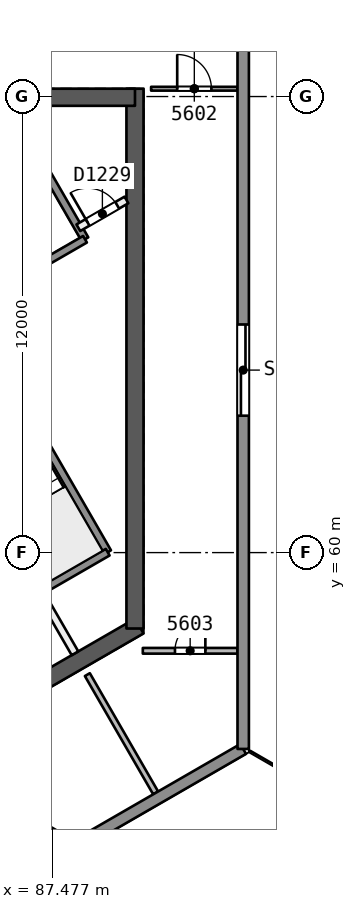
"""IFC4 building model, lengths in metres.
Left out: names, types, materials, properties, quantities, classifications, styles, units other than length and angle.
Written with IfcOpenShell. Run it as: python <this file> out.ifc"""

import sys

from ifc_helpers import new_model, si_unit, direction, frame, frame_2d, origin, origin_2d, place, context, subcontext, project, spatial, rectangle, extrude, element, fill, save


model = new_model("IFC4")
c1 = context("Model", 3, precision=1e-05, world=origin(), true_north=direction((0.0, 1.0)))
c2 = subcontext(c1, "Body", "Model", "MODEL_VIEW")
j1 = project(units=[si_unit("LENGTHUNIT", "METRE"), si_unit("PLANEANGLEUNIT", "RADIAN")], contexts=[c1])
p1 = place(None, origin())
s1 = spatial("IfcSite", under=j1, at=p1, CompositionType="ELEMENT")
p2 = place(p1, origin())
s2 = spatial("IfcBuilding", under=s1, at=p2, CompositionType="ELEMENT")
p3 = place(p2, frame((0.0, 0.0, 228.0)))
s3 = spatial("IfcBuildingStorey", under=s2, at=p3, CompositionType="ELEMENT", Elevation=228.0)
p4 = place(p3, frame((86.723, 56.31, 0.0), z_axis=(0.0, 0.0, 1.0), x_axis=(0.866042179588, 0.49997094233, 0.0)))
e1 = element("IfcWall", 1, at=p4, inside=s3, PredefinedType="SHEAR", context=c2, shape_type="SweptSolid", body=[
    extrude(rectangle(XDim=3.515, YDim=0.45, at=frame_2d((1.758, 0.0))), origin(), (0.0, 0.0, 1.0), 3.7),
])
p5 = place(p3, frame((89.655, 58.002, 0.0), z_axis=(0.0, 0.0, 1.0), x_axis=(0.0, 1.0, 0.0)))
e2 = element("IfcWall", 2, at=p5, inside=s3, PredefinedType="SHEAR", context=c2, shape_type="SweptSolid", body=[
    extrude(rectangle(XDim=14.204, YDim=0.45, at=frame_2d((7.102, 0.0))), origin(), (0.0, 0.0, 1.0), 3.7),
])
p6 = place(p3, frame((89.655, 71.981, 0.0), z_axis=(0.0, 0.0, 1.0), x_axis=(-1.0, 0.0, 0.0)))
e3 = element("IfcWall", 3, at=p6, inside=s3, PredefinedType="SHEAR", context=c2, shape_type="SweptSolid", body=[
    extrude(rectangle(XDim=10.155, YDim=0.45, at=frame_2d((5.078, 0.0))), origin(), (0.0, 0.0, 1.0), 3.7),
])
p7 = place(p6, frame((8.005, 0.0, 0.0)))
e4 = element("IfcOpeningElement", 4, at=p7, cuts=e3, PredefinedType="OPENING", context=c2, shape_type="SweptSolid", body=[
    extrude(rectangle(XDim=1.2, YDim=2.1, at=frame_2d((0.6, 1.05))), frame((0.0, 0.235, 0.0), z_axis=(0.0, -1.0, 0.0), x_axis=(1.0, 0.0, 0.0)), (0.0, 0.0, 1.0), 0.471),
])
p8 = place(p3, frame((91.548, 51.338, 0.0), z_axis=(-0.017607037296, 0.030466109479, 0.999380712447), x_axis=(0.500055571201, -0.865278125299, 0.035187946645)))
e5 = element("IfcColumn", 5, at=p8, inside=s3, PredefinedType="COLUMN", context=c2, shape_type="SweptSolid", body=[
    extrude(rectangle(XDim=1.9, YDim=1.9, at=origin_2d()), origin(), (0.0, 0.0, 1.0), 3.702),
])
p9 = place(p3, frame((90.079, 72.206, 0.0), z_axis=(0.0, 0.0, 1.0), x_axis=(1.0, 0.0, 0.0)))
e6 = element("IfcWall", 6, at=p9, inside=s3, PredefinedType="PARTITIONING", context=c2, shape_type="SweptSolid", body=[
    extrude(rectangle(XDim=2.274, YDim=0.1, at=frame_2d((1.137, 0.0))), origin(), (0.0, 0.0, 1.0), 3.3),
])
p10 = place(p9, frame((0.687, 0.0, 0.0)))
e7 = element("IfcOpeningElement", 7, at=p10, cuts=e6, PredefinedType="OPENING", context=c2, shape_type="SweptSolid", body=[
    extrude(rectangle(XDim=0.9, YDim=2.1, at=frame_2d((0.45, 1.05))), frame((0.0, 0.061, 0.0), z_axis=(0.0, -1.0, 0.0), x_axis=(1.0, 0.0, 0.0)), (0.0, 0.0, 1.0), 0.121),
])
p11 = place(p3, frame((89.861, 57.417, 0.0), z_axis=(0.0, 0.0, 1.0), x_axis=(1.0, 0.0, 0.0)))
e8 = element("IfcWall", 8, at=p11, inside=s3, PredefinedType="PARTITIONING", context=c2, shape_type="SweptSolid", body=[
    extrude(rectangle(XDim=2.492, YDim=0.15, at=frame_2d((1.246, 0.0))), origin(), (0.0, 0.0, 1.0), 3.3),
])
p12 = place(p11, frame((0.846, 0.0, 0.0)))
e9 = element("IfcOpeningElement", 9, at=p12, cuts=e8, PredefinedType="OPENING", context=c2, shape_type="SweptSolid", body=[
    extrude(rectangle(XDim=0.8, YDim=2.1, at=frame_2d((0.4, 1.05))), frame((0.0, 0.085, 0.0), z_axis=(0.0, -1.0, 0.0), x_axis=(1.0, 0.0, 0.0)), (0.0, 0.0, 1.0), 0.171),
])
p13 = place(p3, frame((88.402, 56.789, 0.0), z_axis=(0.0, 0.0, 1.0), x_axis=(0.500032055595, -0.866006895687, 0.0)))
e10 = element("IfcWall", 10, at=p13, inside=s3, PredefinedType="PARTITIONING", context=c2, shape_type="SweptSolid", body=[
    extrude(rectangle(XDim=3.595, YDim=0.15, at=frame_2d((1.797, 0.0))), origin(), (0.0, 0.0, 1.0), 3.3),
])
p14 = place(p3, frame((92.503, 54.834, 0.0), z_axis=(0.0, 0.0, 1.0), x_axis=(-0.866011086668, -0.500024797153, 0.0)))
e11 = element("IfcWall", 11, at=p14, inside=s3, PredefinedType="SOLIDWALL", context=c2, shape_type="SweptSolid", body=[
    extrude(rectangle(XDim=5.149, YDim=0.3, at=frame_2d((2.575, 0.0))), origin(), (0.0, 0.0, 1.0), 3.3),
])
p15 = place(p3, frame((92.503, 105.166, 0.0), z_axis=(0.0, 0.0, 1.0), x_axis=(0.0, -1.0, 0.0)))
e12 = element("IfcWall", 12, at=p15, inside=s3, PredefinedType="SOLIDWALL", context=c2, shape_type="SweptSolid", body=[
    extrude(rectangle(XDim=50.333, YDim=0.3, at=frame_2d((25.166, 0.0))), origin(), (0.0, 0.0, 1.0), 3.3),
])
p16 = place(p15, frame((29.111, 0.0, 0.0)))
e13 = element("IfcOpeningElement", 13, at=p16, cuts=e12, PredefinedType="OPENING", context=c2, shape_type="SweptSolid", body=[
    extrude(rectangle(XDim=2.4, YDim=2.4, at=frame_2d((1.2, 1.2))), frame((0.0, 0.161, 0.0), z_axis=(0.0, -1.0, 0.0), x_axis=(1.0, 0.0, 0.0)), (0.0, 0.0, 1.0), 0.321),
])
p17 = place(p15, frame((39.164, 0.0, 0.0)))
e14 = element("IfcOpeningElement", 14, at=p17, cuts=e12, PredefinedType="OPENING", context=c2, shape_type="SweptSolid", body=[
    extrude(rectangle(XDim=2.4, YDim=2.4, at=frame_2d((1.2, 1.2))), frame((0.0, 0.161, 0.0), z_axis=(0.0, -1.0, 0.0), x_axis=(1.0, 0.0, 0.0)), (0.0, 0.0, 1.0), 0.321),
])
p18 = place(p15, frame((18.666, 0.0, 0.0)))
e15 = element("IfcOpeningElement", 15, at=p18, cuts=e12, PredefinedType="OPENING", context=c2, shape_type="SweptSolid", body=[
    extrude(rectangle(XDim=2.4, YDim=2.4, at=frame_2d((1.2, 1.2))), frame((0.0, 0.161, 0.0), z_axis=(0.0, -1.0, 0.0), x_axis=(1.0, 0.0, 0.0)), (0.0, 0.0, 1.0), 0.321),
])
p19 = place(p15, frame((8.763, 0.0, 0.0)))
e16 = element("IfcOpeningElement", 16, at=p19, cuts=e12, PredefinedType="OPENING", context=c2, shape_type="SweptSolid", body=[
    extrude(rectangle(XDim=2.4, YDim=2.4, at=frame_2d((1.2, 1.2))), frame((0.0, 0.161, 0.0), z_axis=(0.0, -1.0, 0.0), x_axis=(1.0, 0.0, 0.0)), (0.0, 0.0, 1.0), 0.321),
])
p20 = place(p15, frame((23.811, 0.0, 0.0)))
e17 = element("IfcOpeningElement", 17, at=p20, cuts=e12, PredefinedType="OPENING", context=c2, shape_type="SweptSolid", body=[
    extrude(rectangle(XDim=2.4, YDim=2.4, at=frame_2d((1.2, 1.2))), frame((0.0, 0.161, 0.0), z_axis=(0.0, -1.0, 0.0), x_axis=(1.0, 0.0, 0.0)), (0.0, 0.0, 1.0), 0.321),
])
p21 = place(p3, frame((88.043, 52.259, 0.0), z_axis=(0.0, 0.0, 1.0), x_axis=(-0.86602387423, 0.500002649256, 0.0)))
e18 = element("IfcWall", 18, at=p21, inside=s3, PredefinedType="SOLIDWALL", context=c2, shape_type="SweptSolid", body=[
    extrude(rectangle(XDim=50.333, YDim=0.3, at=frame_2d((25.167, 0.0))), origin(), (0.0, 0.0, 1.0), 3.3),
])
p22 = place(p21, frame((23.187, 0.0, 0.0)))
e19 = element("IfcOpeningElement", 19, at=p22, cuts=e18, PredefinedType="OPENING", context=c2, shape_type="SweptSolid", body=[
    extrude(rectangle(XDim=2.4, YDim=2.4, at=frame_2d((1.2, 1.2))), frame((0.0, 0.161, 0.0), z_axis=(0.0, -1.0, 0.0), x_axis=(1.0, 0.0, 0.0)), (0.0, 0.0, 1.0), 0.321),
])
p23 = place(p21, frame((28.799, 0.0, 0.0)))
e20 = element("IfcOpeningElement", 20, at=p23, cuts=e18, PredefinedType="OPENING", context=c2, shape_type="SweptSolid", body=[
    extrude(rectangle(XDim=2.4, YDim=2.4, at=frame_2d((1.2, 1.2))), frame((0.0, 0.161, 0.0), z_axis=(0.0, -1.0, 0.0), x_axis=(1.0, 0.0, 0.0)), (0.0, 0.0, 1.0), 0.321),
])
p24 = place(p21, frame((39.164, 0.0, 0.0)))
e21 = element("IfcOpeningElement", 21, at=p24, cuts=e18, PredefinedType="OPENING", context=c2, shape_type="SweptSolid", body=[
    extrude(rectangle(XDim=2.4, YDim=2.4, at=frame_2d((1.2, 1.2))), frame((0.0, 0.161, 0.0), z_axis=(0.0, -1.0, 0.0), x_axis=(1.0, 0.0, 0.0)), (0.0, 0.0, 1.0), 0.321),
])
p25 = place(p21, frame((18.354, 0.0, 0.0)))
e22 = element("IfcOpeningElement", 22, at=p25, cuts=e18, PredefinedType="OPENING", context=c2, shape_type="SweptSolid", body=[
    extrude(rectangle(XDim=2.4, YDim=2.4, at=frame_2d((1.2, 1.2))), frame((0.0, 0.161, 0.0), z_axis=(0.0, -1.0, 0.0), x_axis=(1.0, 0.0, 0.0)), (0.0, 0.0, 1.0), 0.321),
])
p26 = place(p21, frame((8.763, 0.0, 0.0)))
e23 = element("IfcOpeningElement", 23, at=p26, cuts=e18, PredefinedType="OPENING", context=c2, shape_type="SweptSolid", body=[
    extrude(rectangle(XDim=2.4, YDim=2.4, at=frame_2d((1.2, 1.2))), frame((0.0, 0.161, 0.0), z_axis=(0.0, -1.0, 0.0), x_axis=(1.0, 0.0, 0.0)), (0.0, 0.0, 1.0), 0.321),
])
p27 = place(p3, frame((87.09, 59.06, 0.0), z_axis=(0.0, 0.0, 1.0), x_axis=(0.500011643316, -0.866018681408, 0.0)))
e24 = element("IfcWall", 24, at=p27, inside=s3, PredefinedType="PARTITIONING", context=c2, shape_type="SweptSolid", body=[
    extrude(rectangle(XDim=1.973, YDim=0.2, at=frame_2d((0.987, 0.0))), origin(), (0.0, 0.0, 1.0), 3.3),
])
p28 = place(p3, frame((85.087, 66.679, 0.0), z_axis=(0.0, 0.0, 1.0), x_axis=(0.500019787375, -0.866013979237, 0.0)))
e25 = element("IfcWall", 25, at=p28, inside=s3, PredefinedType="SOLIDWALL", context=c2, shape_type="SweptSolid", body=[
    extrude(rectangle(XDim=7.7, YDim=0.2, at=frame_2d((3.85, 0.0))), origin(), (0.0, 0.0, 1.0), 3.3),
])
p29 = place(p28, frame((0.55, 0.0, 0.0)))
e26 = element("IfcOpeningElement", 26, at=p29, cuts=e25, PredefinedType="OPENING", context=c2, shape_type="SweptSolid", body=[
    extrude(rectangle(XDim=1.1, YDim=2.1, at=frame_2d((0.55, 1.05))), frame((0.0, 0.11, 0.0), z_axis=(0.0, -1.0, 0.0), x_axis=(1.0, 0.0, 0.0)), (0.0, 0.0, 1.0), 0.221),
])
p30 = place(p3, frame((86.965, 70.626, 0.0), z_axis=(0.0, 0.0, 1.0), x_axis=(0.499996545922, -0.866027397988, 0.0)))
e27 = element("IfcWall", 27, at=p30, inside=s3, PredefinedType="SOLIDWALL", context=c2, shape_type="SweptSolid", body=[
    extrude(rectangle(XDim=2.75, YDim=0.2, at=frame_2d((1.375, 0.0))), origin(), (0.0, 0.0, 1.0), 3.3),
])
p31 = place(p3, frame((88.165, 68.548, 0.0), z_axis=(0.0, 0.0, 1.0), x_axis=(0.866013036001, 0.500021421018, 0.0)))
e28 = element("IfcWall", 28, at=p31, inside=s3, PredefinedType="PARTITIONING", context=c2, shape_type="SweptSolid", body=[
    extrude(rectangle(XDim=1.461, YDim=0.2, at=frame_2d((0.73, 0.0))), origin(), (0.0, 0.0, 1.0), 3.3),
])
p32 = place(p31, frame((0.281, 0.0, 0.0)))
e29 = element("IfcOpeningElement", 29, at=p32, cuts=e28, PredefinedType="OPENING", context=c2, shape_type="SweptSolid", body=[
    extrude(rectangle(XDim=0.9, YDim=2.1, at=frame_2d((0.45, 1.05))), frame((0.0, 0.11, 0.0), z_axis=(0.0, -1.0, 0.0), x_axis=(1.0, 0.0, 0.0)), (0.0, 0.0, 1.0), 0.221),
])
p33 = place(p3, frame((86.348, 67.095, 0.0), z_axis=(0.0, 0.0, 1.0), x_axis=(0.86602648383, 0.499998129301, 0.0)))
e30 = element("IfcWall", 30, at=p33, inside=s3, PredefinedType="SOLIDWALL", context=c2, shape_type="SweptSolid", body=[
    extrude(rectangle(XDim=2.3, YDim=0.2, at=frame_2d((1.15, 0.0))), origin(), (0.0, 0.0, 1.0), 3.3),
])
p34 = place(p3, frame((85.343, 57.935, 0.0), z_axis=(0.0, 0.0, 1.0), x_axis=(0.866004344652, 0.500036473714, 0.0)))
e31 = element("IfcWall", 31, at=p34, inside=s3, PredefinedType="SOLIDWALL", context=c2, shape_type="SweptSolid", body=[
    extrude(rectangle(XDim=4.15, YDim=0.2, at=frame_2d((2.075, 0.0))), origin(), (0.0, 0.0, 1.0), 3.3),
])
p35 = place(p10, origin())
e32 = element("IfcDoor", 32, at=p35, inside=s3, OperationType="SINGLE_SWING_LEFT", PredefinedType="NOTDEFINED", context=c2, shape_type="SweptSolid", body=[
    extrude(rectangle(XDim=0.9, YDim=2.1, at=frame_2d((0.45, 1.05))), frame((0.0, 0.025, 0.0), z_axis=(0.0, -1.0, 0.0), x_axis=(1.0, 0.0, 0.0)), (0.0, 0.0, 1.0), 0.05),
])
fill(e7, e32)
p36 = place(p12, origin())
e33 = element("IfcDoor", 33, at=p36, inside=s3, OperationType="SINGLE_SWING_RIGHT", PredefinedType="NOTDEFINED", context=c2, shape_type="SweptSolid", body=[
    extrude(rectangle(XDim=0.8, YDim=2.1, at=frame_2d((0.4, 1.05))), frame((0.0, 0.025, 0.0), z_axis=(0.0, -1.0, 0.0), x_axis=(1.0, 0.0, 0.0)), (0.0, 0.0, 1.0), 0.05),
])
fill(e9, e33)
p37 = place(p17, origin())
e34 = element("IfcDoor", 34, at=p37, inside=s3, OperationType="SLIDING_TO_RIGHT", PredefinedType="NOTDEFINED", context=c2, shape_type="SweptSolid", body=[
    extrude(rectangle(XDim=2.4, YDim=2.4, at=frame_2d((1.2, 1.2))), frame((0.0, 0.025, 0.0), z_axis=(0.0, -1.0, 0.0), x_axis=(1.0, 0.0, 0.0)), (0.0, 0.0, 1.0), 0.05),
])
fill(e14, e34)
p38 = place(p32, origin())
e35 = element("IfcDoor", 35, at=p38, inside=s3, OperationType="SINGLE_SWING_LEFT", PredefinedType="NOTDEFINED", context=c2, shape_type="SweptSolid", body=[
    extrude(rectangle(XDim=0.9, YDim=2.1, at=frame_2d((0.45, 1.05))), frame((0.0, 0.025, 0.0), z_axis=(0.0, -1.0, 0.0), x_axis=(1.0, 0.0, 0.0)), (0.0, 0.0, 1.0), 0.05),
])
fill(e29, e35)
save(model, sys.argv[1])
